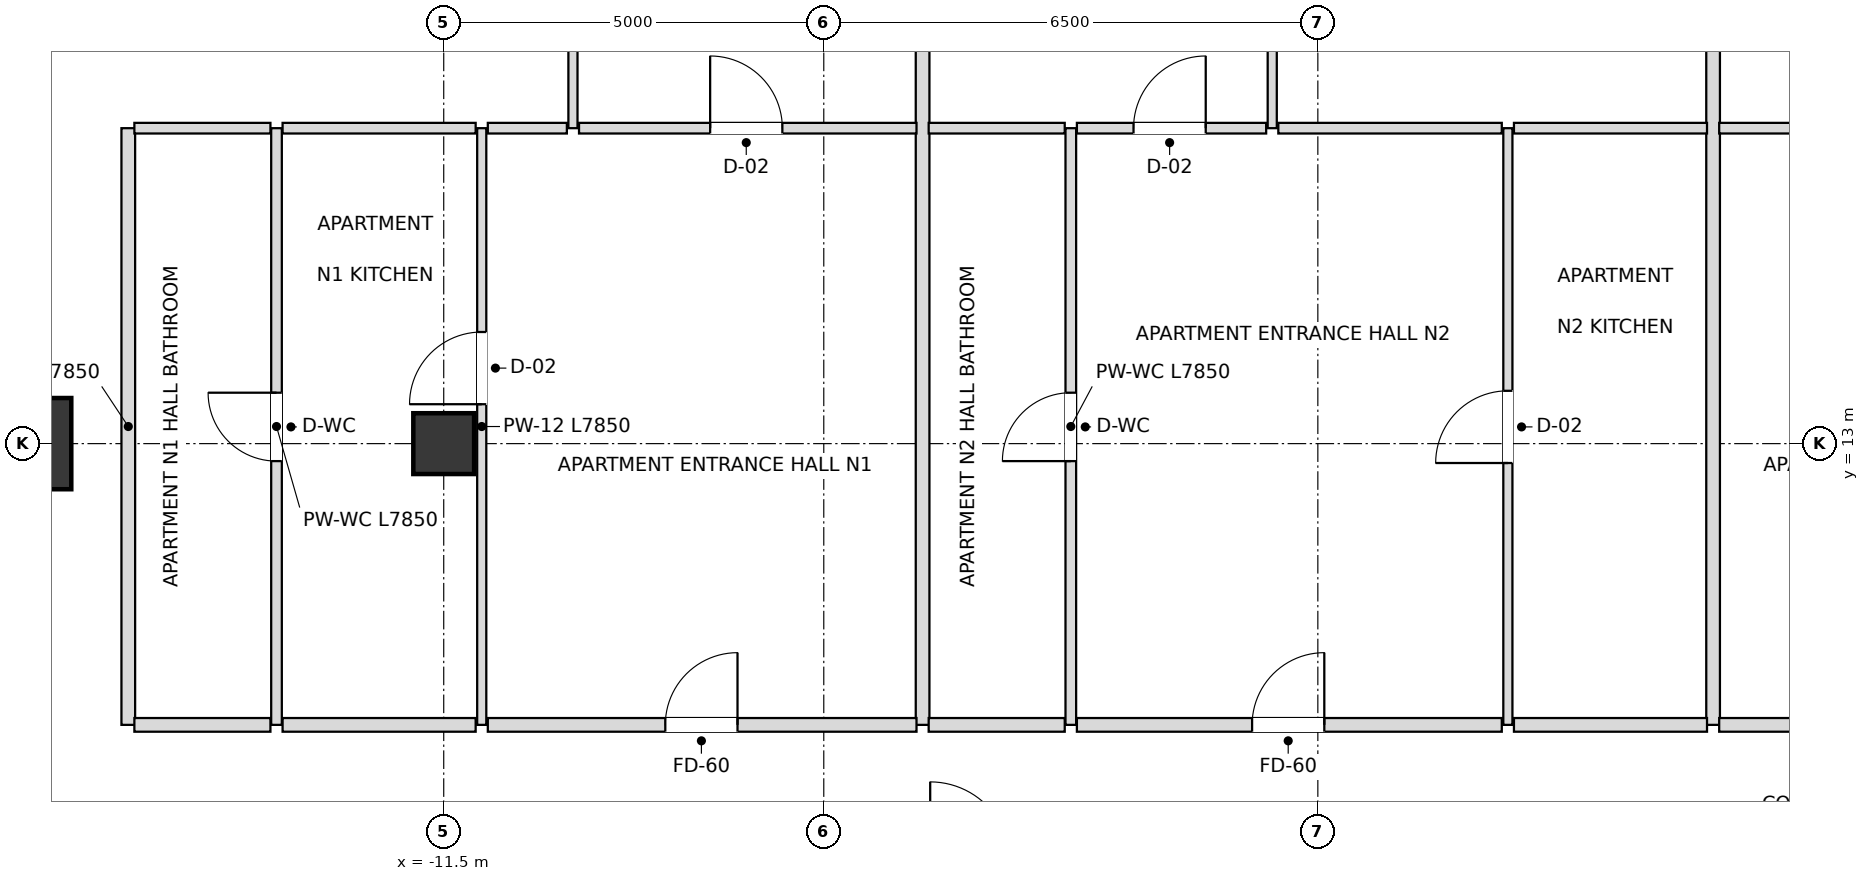
"""IFC4 building model, lengths in metres.
Left out: names, types, materials, properties, quantities, classifications, styles, units other than length and angle.
Written with IfcOpenShell. Run it as: python <this file> out.ifc"""

import sys

from ifc_helpers import new_model, si_unit, direction, frame, frame_2d, origin, origin_2d, place, context, subcontext, project, spatial, rectangle, extrude, element, fill, save


model = new_model("IFC4")
c1 = context("Model", 3, precision=1e-05, world=origin(), true_north=direction((0.0, 1.0)))
c2 = subcontext(c1, "Body", "Model", "MODEL_VIEW")
j1 = project(units=[si_unit("LENGTHUNIT", "METRE"), si_unit("PLANEANGLEUNIT", "RADIAN")], contexts=[c1])
p1 = place(None, origin())
s1 = spatial("IfcSite", under=j1, at=p1, CompositionType="ELEMENT")
p2 = place(p1, origin())
s2 = spatial("IfcBuilding", under=s1, at=p2, CompositionType="ELEMENT")
p3 = place(p2, frame((0.0, 0.0, 113.4)))
s3 = spatial("IfcBuildingStorey", under=s2, at=p3, CompositionType="ELEMENT", Elevation=113.4)
p4 = place(p3, frame((-17.0, 13.0, 0.0), z_axis=(0.0, 0.0, 1.0), x_axis=(1.0, 0.0, 0.0)))
e1 = element("IfcColumn", 1, at=p4, inside=s3, PredefinedType="USERDEFINED", context=c2, shape_type="SweptSolid", body=[
    extrude(rectangle(XDim=1.2, YDim=1.2, at=origin_2d()), origin(), (0.0, 0.0, 1.0), 3.6),
])
p5 = place(p3, frame((-11.5, 13.0, 0.0), z_axis=(0.0, 0.0, 1.0), x_axis=(1.0, 0.0, 0.0)))
e2 = element("IfcColumn", 2, at=p5, inside=s3, PredefinedType="COLUMN", context=c2, shape_type="SweptSolid", body=[
    extrude(rectangle(XDim=0.8, YDim=0.8, at=origin_2d()), origin(), (0.0, 0.0, 1.0), 3.6),
])
p6 = place(p3, frame((-15.65, 9.3, 0.0), z_axis=(0.0, 0.0, 1.0), x_axis=(0.0, 1.0, 0.0)))
e3 = element("IfcWall", 3, at=p6, inside=s3, PredefinedType="PARTITIONING", context=c2, shape_type="SweptSolid", body=[
    extrude(rectangle(XDim=7.85, YDim=0.18, at=frame_2d((3.925, 0.0))), origin(), (0.0, 0.0, 1.0), 2.736),
])
p7 = place(p3, frame((-13.7, 9.3, 0.0), z_axis=(0.0, 0.0, 1.0), x_axis=(0.0, 1.0, 0.0)))
e4 = element("IfcWall", 4, at=p7, inside=s3, PredefinedType="PARTITIONING", context=c2, shape_type="SweptSolid", body=[
    extrude(rectangle(XDim=7.85, YDim=0.14, at=frame_2d((3.925, 0.0))), origin(), (0.0, 0.0, 1.0), 2.736),
])
p8 = place(p7, frame((3.47, 0.0, 0.0)))
e5 = element("IfcOpeningElement", 5, at=p8, cuts=e4, PredefinedType="OPENING", context=c2, shape_type="SweptSolid", body=[
    extrude(rectangle(XDim=0.9, YDim=2.1, at=frame_2d((0.45, 1.05))), frame((0.0, 0.08, 0.0), z_axis=(0.0, -1.0, 0.0), x_axis=(1.0, 0.0, 0.0)), (0.0, 0.0, 1.0), 0.16),
])
p9 = place(p3, frame((-11.0, 9.3, 0.0), z_axis=(0.0, 0.0, 1.0), x_axis=(0.0, 1.0, 0.0)))
e6 = element("IfcWall", 6, at=p9, inside=s3, PredefinedType="PARTITIONING", context=c2, shape_type="SweptSolid", body=[
    extrude(rectangle(XDim=7.85, YDim=0.12, at=frame_2d((3.925, 0.0))), origin(), (0.0, 0.0, 1.0), 2.816),
])
p10 = place(p9, frame((4.219, 0.0, 0.0)))
e7 = element("IfcOpeningElement", 7, at=p10, cuts=e6, PredefinedType="OPENING", context=c2, shape_type="SweptSolid", body=[
    extrude(rectangle(XDim=0.95, YDim=2.1, at=frame_2d((0.475, 1.05))), frame((0.0, 0.07, 0.0), z_axis=(0.0, -1.0, 0.0), x_axis=(1.0, 0.0, 0.0)), (0.0, 0.0, 1.0), 0.14),
])
p11 = place(p3, frame((-9.8, 17.15, 0.0), z_axis=(0.0, 0.0, 1.0), x_axis=(0.0, 1.0, 0.0)))
e8 = element("IfcWall", 8, at=p11, inside=s3, PredefinedType="PARTITIONING", context=c2, shape_type="SweptSolid", body=[
    extrude(rectangle(XDim=6.0, YDim=0.12, at=frame_2d((3.0, 0.0))), origin(), (0.0, 0.0, 1.0), 2.816),
])
p12 = place(p11, frame((3.701, 0.0, 0.0)))
e9 = element("IfcOpeningElement", 9, at=p12, cuts=e8, PredefinedType="OPENING", context=c2, shape_type="SweptSolid", body=[
    extrude(rectangle(XDim=0.9, YDim=2.1, at=frame_2d((0.45, 1.05))), frame((0.0, 0.07, 0.0), z_axis=(0.0, -1.0, 0.0), x_axis=(1.0, 0.0, 0.0)), (0.0, 0.0, 1.0), 0.14),
])
p13 = place(p3, frame((-5.2, 9.3, 0.0), z_axis=(0.0, 0.0, 1.0), x_axis=(0.0, 1.0, 0.0)))
e10 = element("IfcWall", 10, at=p13, inside=s3, PredefinedType="PARTITIONING", context=c2, shape_type="SweptSolid", body=[
    extrude(rectangle(XDim=13.85, YDim=0.18, at=frame_2d((6.925, 0.0))), origin(), (0.0, 0.0, 1.0), 2.816),
])
p14 = place(p3, frame((-3.25, 9.3, 0.0), z_axis=(0.0, 0.0, 1.0), x_axis=(0.0, 1.0, 0.0)))
e11 = element("IfcWall", 11, at=p14, inside=s3, PredefinedType="PARTITIONING", context=c2, shape_type="SweptSolid", body=[
    extrude(rectangle(XDim=7.85, YDim=0.14, at=frame_2d((3.925, 0.0))), origin(), (0.0, 0.0, 1.0), 3.38),
])
p15 = place(p14, frame((3.47, 0.0, 0.0)))
e12 = element("IfcOpeningElement", 12, at=p15, cuts=e11, PredefinedType="OPENING", context=c2, shape_type="SweptSolid", body=[
    extrude(rectangle(XDim=0.9, YDim=2.1, at=frame_2d((0.45, 1.05))), frame((0.0, 0.08, 0.0), z_axis=(0.0, -1.0, 0.0), x_axis=(1.0, 0.0, 0.0)), (0.0, 0.0, 1.0), 0.16),
])
p16 = place(p3, frame((-0.6, 17.15, 0.0), z_axis=(0.0, 0.0, 1.0), x_axis=(0.0, 1.0, 0.0)))
e13 = element("IfcWall", 13, at=p16, inside=s3, PredefinedType="PARTITIONING", context=c2, shape_type="SweptSolid", body=[
    extrude(rectangle(XDim=6.0, YDim=0.12, at=frame_2d((3.0, 0.0))), origin(), (0.0, 0.0, 1.0), 2.816),
])
p17 = place(p16, frame((2.55, 0.0, 0.0)))
e14 = element("IfcOpeningElement", 14, at=p17, cuts=e13, PredefinedType="OPENING", context=c2, shape_type="SweptSolid", body=[
    extrude(rectangle(XDim=0.9, YDim=2.1, at=frame_2d((0.45, 1.05))), frame((0.0, 0.07, 0.0), z_axis=(0.0, -1.0, 0.0), x_axis=(1.0, 0.0, 0.0)), (0.0, 0.0, 1.0), 0.14),
])
p18 = place(p3, frame((2.5, 9.3, 0.0), z_axis=(0.0, 0.0, 1.0), x_axis=(0.0, 1.0, 0.0)))
e15 = element("IfcWall", 15, at=p18, inside=s3, PredefinedType="PARTITIONING", context=c2, shape_type="SweptSolid", body=[
    extrude(rectangle(XDim=7.85, YDim=0.12, at=frame_2d((3.925, 0.0))), origin(), (0.0, 0.0, 1.0), 3.38),
])
p19 = place(p18, frame((3.445, 0.0, 0.0)))
e16 = element("IfcOpeningElement", 16, at=p19, cuts=e15, PredefinedType="OPENING", context=c2, shape_type="SweptSolid", body=[
    extrude(rectangle(XDim=0.95, YDim=2.1, at=frame_2d((0.475, 1.05))), frame((0.0, 0.07, 0.0), z_axis=(0.0, -1.0, 0.0), x_axis=(1.0, 0.0, 0.0)), (0.0, 0.0, 1.0), 0.14),
])
p20 = place(p3, frame((5.2, 9.3, 0.0), z_axis=(0.0, 0.0, 1.0), x_axis=(0.0, 1.0, 0.0)))
e17 = element("IfcWall", 17, at=p20, inside=s3, PredefinedType="PARTITIONING", context=c2, shape_type="SweptSolid", body=[
    extrude(rectangle(XDim=13.85, YDim=0.18, at=frame_2d((6.925, 0.0))), origin(), (0.0, 0.0, 1.0), 2.816),
])
p21 = place(p3, frame((-15.57, 9.3, 0.0), z_axis=(0.0, 0.0, 1.0), x_axis=(1.0, 0.0, 0.0)))
e18 = element("IfcWall", 18, at=p21, inside=s3, PredefinedType="PARTITIONING", context=c2, shape_type="SweptSolid", body=[
    extrude(rectangle(XDim=1.79, YDim=0.18, at=frame_2d((0.895, 0.0))), origin(), (0.0, 0.0, 1.0), 3.38),
])
p22 = place(p3, frame((-13.62, 9.3, 0.0), z_axis=(0.0, 0.0, 1.0), x_axis=(1.0, 0.0, 0.0)))
e19 = element("IfcWall", 19, at=p22, inside=s3, PredefinedType="PARTITIONING", context=c2, shape_type="SweptSolid", body=[
    extrude(rectangle(XDim=2.54, YDim=0.18, at=frame_2d((1.27, 0.0))), origin(), (0.0, 0.0, 1.0), 3.38),
])
p23 = place(p3, frame((-10.92, 9.3, 0.0), z_axis=(0.0, 0.0, 1.0), x_axis=(1.0, 0.0, 0.0)))
e20 = element("IfcWall", 20, at=p23, inside=s3, PredefinedType="PARTITIONING", context=c2, shape_type="SweptSolid", body=[
    extrude(rectangle(XDim=5.64, YDim=0.18, at=frame_2d((2.82, 0.0))), origin(), (0.0, 0.0, 1.0), 2.816),
])
p24 = place(p23, frame((2.335, 0.0, 0.0)))
e21 = element("IfcOpeningElement", 21, at=p24, cuts=e20, PredefinedType="OPENING", context=c2, shape_type="SweptSolid", body=[
    extrude(rectangle(XDim=0.95, YDim=2.15, at=frame_2d((0.475, 1.075))), frame((0.0, 0.1, 0.0), z_axis=(0.0, -1.0, 0.0), x_axis=(1.0, 0.0, 0.0)), (0.0, 0.0, 1.0), 0.2),
])
p25 = place(p3, frame((-5.12, 9.3, 0.0), z_axis=(0.0, 0.0, 1.0), x_axis=(1.0, 0.0, 0.0)))
e22 = element("IfcWall", 22, at=p25, inside=s3, PredefinedType="PARTITIONING", context=c2, shape_type="SweptSolid", body=[
    extrude(rectangle(XDim=1.79, YDim=0.18, at=frame_2d((0.895, 0.0))), origin(), (0.0, 0.0, 1.0), 3.38),
])
p26 = place(p3, frame((-3.17, 9.3, 0.0), z_axis=(0.0, 0.0, 1.0), x_axis=(1.0, 0.0, 0.0)))
e23 = element("IfcWall", 23, at=p26, inside=s3, PredefinedType="PARTITIONING", context=c2, shape_type="SweptSolid", body=[
    extrude(rectangle(XDim=5.59, YDim=0.18, at=frame_2d((2.795, 0.0))), origin(), (0.0, 0.0, 1.0), 3.38),
])
p27 = place(p26, frame((2.305, 0.0, 0.0)))
e24 = element("IfcOpeningElement", 24, at=p27, cuts=e23, PredefinedType="OPENING", context=c2, shape_type="SweptSolid", body=[
    extrude(rectangle(XDim=0.95, YDim=2.15, at=frame_2d((0.475, 1.075))), frame((0.0, 0.1, 0.0), z_axis=(0.0, -1.0, 0.0), x_axis=(1.0, 0.0, 0.0)), (0.0, 0.0, 1.0), 0.2),
])
p28 = place(p3, frame((2.58, 9.3, 0.0), z_axis=(0.0, 0.0, 1.0), x_axis=(1.0, 0.0, 0.0)))
e25 = element("IfcWall", 25, at=p28, inside=s3, PredefinedType="PARTITIONING", context=c2, shape_type="SweptSolid", body=[
    extrude(rectangle(XDim=2.54, YDim=0.18, at=frame_2d((1.27, 0.0))), origin(), (0.0, 0.0, 1.0), 3.38),
])
p29 = place(p3, frame((5.28, 9.3, 0.0), z_axis=(0.0, 0.0, 1.0), x_axis=(1.0, 0.0, 0.0)))
e26 = element("IfcWall", 26, at=p29, inside=s3, PredefinedType="PARTITIONING", context=c2, shape_type="SweptSolid", body=[
    extrude(rectangle(XDim=5.64, YDim=0.18, at=frame_2d((2.82, 0.0))), origin(), (0.0, 0.0, 1.0), 2.816),
])
p30 = place(p29, frame((2.345, 0.0, 0.0)))
e27 = element("IfcOpeningElement", 27, at=p30, cuts=e26, PredefinedType="OPENING", context=c2, shape_type="SweptSolid", body=[
    extrude(rectangle(XDim=0.95, YDim=2.15, at=frame_2d((0.475, 1.075))), frame((0.0, 0.1, 0.0), z_axis=(0.0, -1.0, 0.0), x_axis=(1.0, 0.0, 0.0)), (0.0, 0.0, 1.0), 0.2),
])
p31 = place(p3, frame((-15.57, 17.15, 0.0), z_axis=(0.0, 0.0, 1.0), x_axis=(1.0, 0.0, 0.0)))
e28 = element("IfcWall", 28, at=p31, inside=s3, PredefinedType="PARTITIONING", context=c2, shape_type="SweptSolid", body=[
    extrude(rectangle(XDim=1.79, YDim=0.14, at=frame_2d((0.895, 0.0))), origin(), (0.0, 0.0, 1.0), 2.736),
])
p32 = place(p3, frame((-13.62, 17.15, 0.0), z_axis=(0.0, 0.0, 1.0), x_axis=(1.0, 0.0, 0.0)))
e29 = element("IfcWall", 29, at=p32, inside=s3, PredefinedType="PARTITIONING", context=c2, shape_type="SweptSolid", body=[
    extrude(rectangle(XDim=2.54, YDim=0.14, at=frame_2d((1.27, 0.0))), origin(), (0.0, 0.0, 1.0), 2.736),
])
p33 = place(p3, frame((-10.92, 17.15, 0.0), z_axis=(0.0, 0.0, 1.0), x_axis=(1.0, 0.0, 0.0)))
e30 = element("IfcWall", 30, at=p33, inside=s3, PredefinedType="PARTITIONING", context=c2, shape_type="SweptSolid", body=[
    extrude(rectangle(XDim=1.04, YDim=0.14, at=frame_2d((0.52, 0.0))), origin(), (0.0, 0.0, 1.0), 3.38),
])
p34 = place(p3, frame((-9.72, 17.15, 0.0), z_axis=(0.0, 0.0, 1.0), x_axis=(1.0, 0.0, 0.0)))
e31 = element("IfcWall", 31, at=p34, inside=s3, PredefinedType="PARTITIONING", context=c2, shape_type="SweptSolid", body=[
    extrude(rectangle(XDim=4.44, YDim=0.14, at=frame_2d((2.22, 0.0))), origin(), (0.0, 0.0, 1.0), 2.816),
])
p35 = place(p34, frame((1.725, 0.0, 0.0)))
e32 = element("IfcOpeningElement", 32, at=p35, cuts=e31, PredefinedType="OPENING", context=c2, shape_type="SweptSolid", body=[
    extrude(rectangle(XDim=0.95, YDim=2.1, at=frame_2d((0.475, 1.05))), frame((0.0, 0.08, 0.0), z_axis=(0.0, -1.0, 0.0), x_axis=(1.0, 0.0, 0.0)), (0.0, 0.0, 1.0), 0.16),
])
p36 = place(p3, frame((-5.12, 17.15, 0.0), z_axis=(0.0, 0.0, 1.0), x_axis=(1.0, 0.0, 0.0)))
e33 = element("IfcWall", 33, at=p36, inside=s3, PredefinedType="PARTITIONING", context=c2, shape_type="SweptSolid", body=[
    extrude(rectangle(XDim=1.79, YDim=0.14, at=frame_2d((0.895, 0.0))), origin(), (0.0, 0.0, 1.0), 3.38),
])
p37 = place(p3, frame((-3.17, 17.15, 0.0), z_axis=(0.0, 0.0, 1.0), x_axis=(1.0, 0.0, 0.0)))
e34 = element("IfcWall", 34, at=p37, inside=s3, PredefinedType="PARTITIONING", context=c2, shape_type="SweptSolid", body=[
    extrude(rectangle(XDim=2.49, YDim=0.14, at=frame_2d((1.245, 0.0))), origin(), (0.0, 0.0, 1.0), 3.38),
])
p38 = place(p37, frame((0.745, 0.0, 0.0)))
e35 = element("IfcOpeningElement", 35, at=p38, cuts=e34, PredefinedType="OPENING", context=c2, shape_type="SweptSolid", body=[
    extrude(rectangle(XDim=0.95, YDim=2.1, at=frame_2d((0.475, 1.05))), frame((0.0, 0.08, 0.0), z_axis=(0.0, -1.0, 0.0), x_axis=(1.0, 0.0, 0.0)), (0.0, 0.0, 1.0), 0.16),
])
p39 = place(p3, frame((-0.52, 17.15, 0.0), z_axis=(0.0, 0.0, 1.0), x_axis=(1.0, 0.0, 0.0)))
e36 = element("IfcWall", 36, at=p39, inside=s3, PredefinedType="PARTITIONING", context=c2, shape_type="SweptSolid", body=[
    extrude(rectangle(XDim=2.94, YDim=0.14, at=frame_2d((1.47, 0.0))), origin(), (0.0, 0.0, 1.0), 3.38),
])
p40 = place(p3, frame((2.58, 17.15, 0.0), z_axis=(0.0, 0.0, 1.0), x_axis=(1.0, 0.0, 0.0)))
e37 = element("IfcWall", 37, at=p40, inside=s3, PredefinedType="PARTITIONING", context=c2, shape_type="SweptSolid", body=[
    extrude(rectangle(XDim=2.54, YDim=0.14, at=frame_2d((1.27, 0.0))), origin(), (0.0, 0.0, 1.0), 3.38),
])
p41 = place(p3, frame((5.28, 17.15, 0.0), z_axis=(0.0, 0.0, 1.0), x_axis=(1.0, 0.0, 0.0)))
e38 = element("IfcWall", 38, at=p41, inside=s3, PredefinedType="PARTITIONING", context=c2, shape_type="SweptSolid", body=[
    extrude(rectangle(XDim=4.44, YDim=0.14, at=frame_2d((2.22, 0.0))), origin(), (0.0, 0.0, 1.0), 2.816),
])
p42 = place(p41, frame((1.765, 0.0, 0.0)))
e39 = element("IfcOpeningElement", 39, at=p42, cuts=e38, PredefinedType="OPENING", context=c2, shape_type="SweptSolid", body=[
    extrude(rectangle(XDim=0.95, YDim=2.1, at=frame_2d((0.475, 1.05))), frame((0.0, 0.08, 0.0), z_axis=(0.0, -1.0, 0.0), x_axis=(1.0, 0.0, 0.0)), (0.0, 0.0, 1.0), 0.16),
])
p43 = place(p24, origin())
e40 = element("IfcDoor", 40, at=p43, inside=s3, OperationType="SINGLE_SWING_RIGHT", PredefinedType="DOOR", context=c2, shape_type="SweptSolid", body=[
    extrude(rectangle(XDim=0.95, YDim=2.15, at=frame_2d((0.475, 1.075))), frame((0.0, 0.025, 0.0), z_axis=(0.0, -1.0, 0.0), x_axis=(1.0, 0.0, 0.0)), (0.0, 0.0, 1.0), 0.05),
])
fill(e21, e40)
p44 = place(p10, origin())
e41 = element("IfcDoor", 41, at=p44, inside=s3, OperationType="SINGLE_SWING_LEFT", PredefinedType="DOOR", context=c2, shape_type="SweptSolid", body=[
    extrude(rectangle(XDim=0.95, YDim=2.1, at=frame_2d((0.475, 1.05))), frame((0.0, 0.025, 0.0), z_axis=(0.0, -1.0, 0.0), x_axis=(1.0, 0.0, 0.0)), (0.0, 0.0, 1.0), 0.05),
])
fill(e7, e41)
p45 = place(p8, origin())
e42 = element("IfcDoor", 42, at=p45, inside=s3, OperationType="SINGLE_SWING_RIGHT", PredefinedType="DOOR", context=c2, shape_type="SweptSolid", body=[
    extrude(rectangle(XDim=0.9, YDim=2.1, at=frame_2d((0.45, 1.05))), frame((0.0, 0.025, 0.0), z_axis=(0.0, -1.0, 0.0), x_axis=(1.0, 0.0, 0.0)), (0.0, 0.0, 1.0), 0.05),
])
fill(e5, e42)
p46 = place(p35, origin())
e43 = element("IfcDoor", 43, at=p46, inside=s3, OperationType="SINGLE_SWING_LEFT", PredefinedType="DOOR", context=c2, shape_type="SweptSolid", body=[
    extrude(rectangle(XDim=0.95, YDim=2.1, at=frame_2d((0.475, 1.05))), frame((0.0, 0.025, 0.0), z_axis=(0.0, -1.0, 0.0), x_axis=(1.0, 0.0, 0.0)), (0.0, 0.0, 1.0), 0.05),
])
fill(e32, e43)
p47 = place(p15, origin())
e44 = element("IfcDoor", 44, at=p47, inside=s3, OperationType="SINGLE_SWING_LEFT", PredefinedType="DOOR", context=c2, shape_type="SweptSolid", body=[
    extrude(rectangle(XDim=0.9, YDim=2.1, at=frame_2d((0.45, 1.05))), frame((0.0, 0.025, 0.0), z_axis=(0.0, -1.0, 0.0), x_axis=(1.0, 0.0, 0.0)), (0.0, 0.0, 1.0), 0.05),
])
fill(e12, e44)
p48 = place(p27, origin())
e45 = element("IfcDoor", 45, at=p48, inside=s3, OperationType="SINGLE_SWING_RIGHT", PredefinedType="DOOR", context=c2, shape_type="SweptSolid", body=[
    extrude(rectangle(XDim=0.95, YDim=2.15, at=frame_2d((0.475, 1.075))), frame((0.0, 0.025, 0.0), z_axis=(0.0, -1.0, 0.0), x_axis=(1.0, 0.0, 0.0)), (0.0, 0.0, 1.0), 0.05),
])
fill(e24, e45)
p49 = place(p19, origin())
e46 = element("IfcDoor", 46, at=p49, inside=s3, OperationType="SINGLE_SWING_LEFT", PredefinedType="DOOR", context=c2, shape_type="SweptSolid", body=[
    extrude(rectangle(XDim=0.95, YDim=2.1, at=frame_2d((0.475, 1.05))), frame((0.0, 0.025, 0.0), z_axis=(0.0, -1.0, 0.0), x_axis=(1.0, 0.0, 0.0)), (0.0, 0.0, 1.0), 0.05),
])
fill(e16, e46)
p50 = place(p38, origin())
e47 = element("IfcDoor", 47, at=p50, inside=s3, OperationType="SINGLE_SWING_RIGHT", PredefinedType="DOOR", context=c2, shape_type="SweptSolid", body=[
    extrude(rectangle(XDim=0.95, YDim=2.1, at=frame_2d((0.475, 1.05))), frame((0.0, 0.025, 0.0), z_axis=(0.0, -1.0, 0.0), x_axis=(1.0, 0.0, 0.0)), (0.0, 0.0, 1.0), 0.05),
])
fill(e35, e47)
save(model, sys.argv[1])
